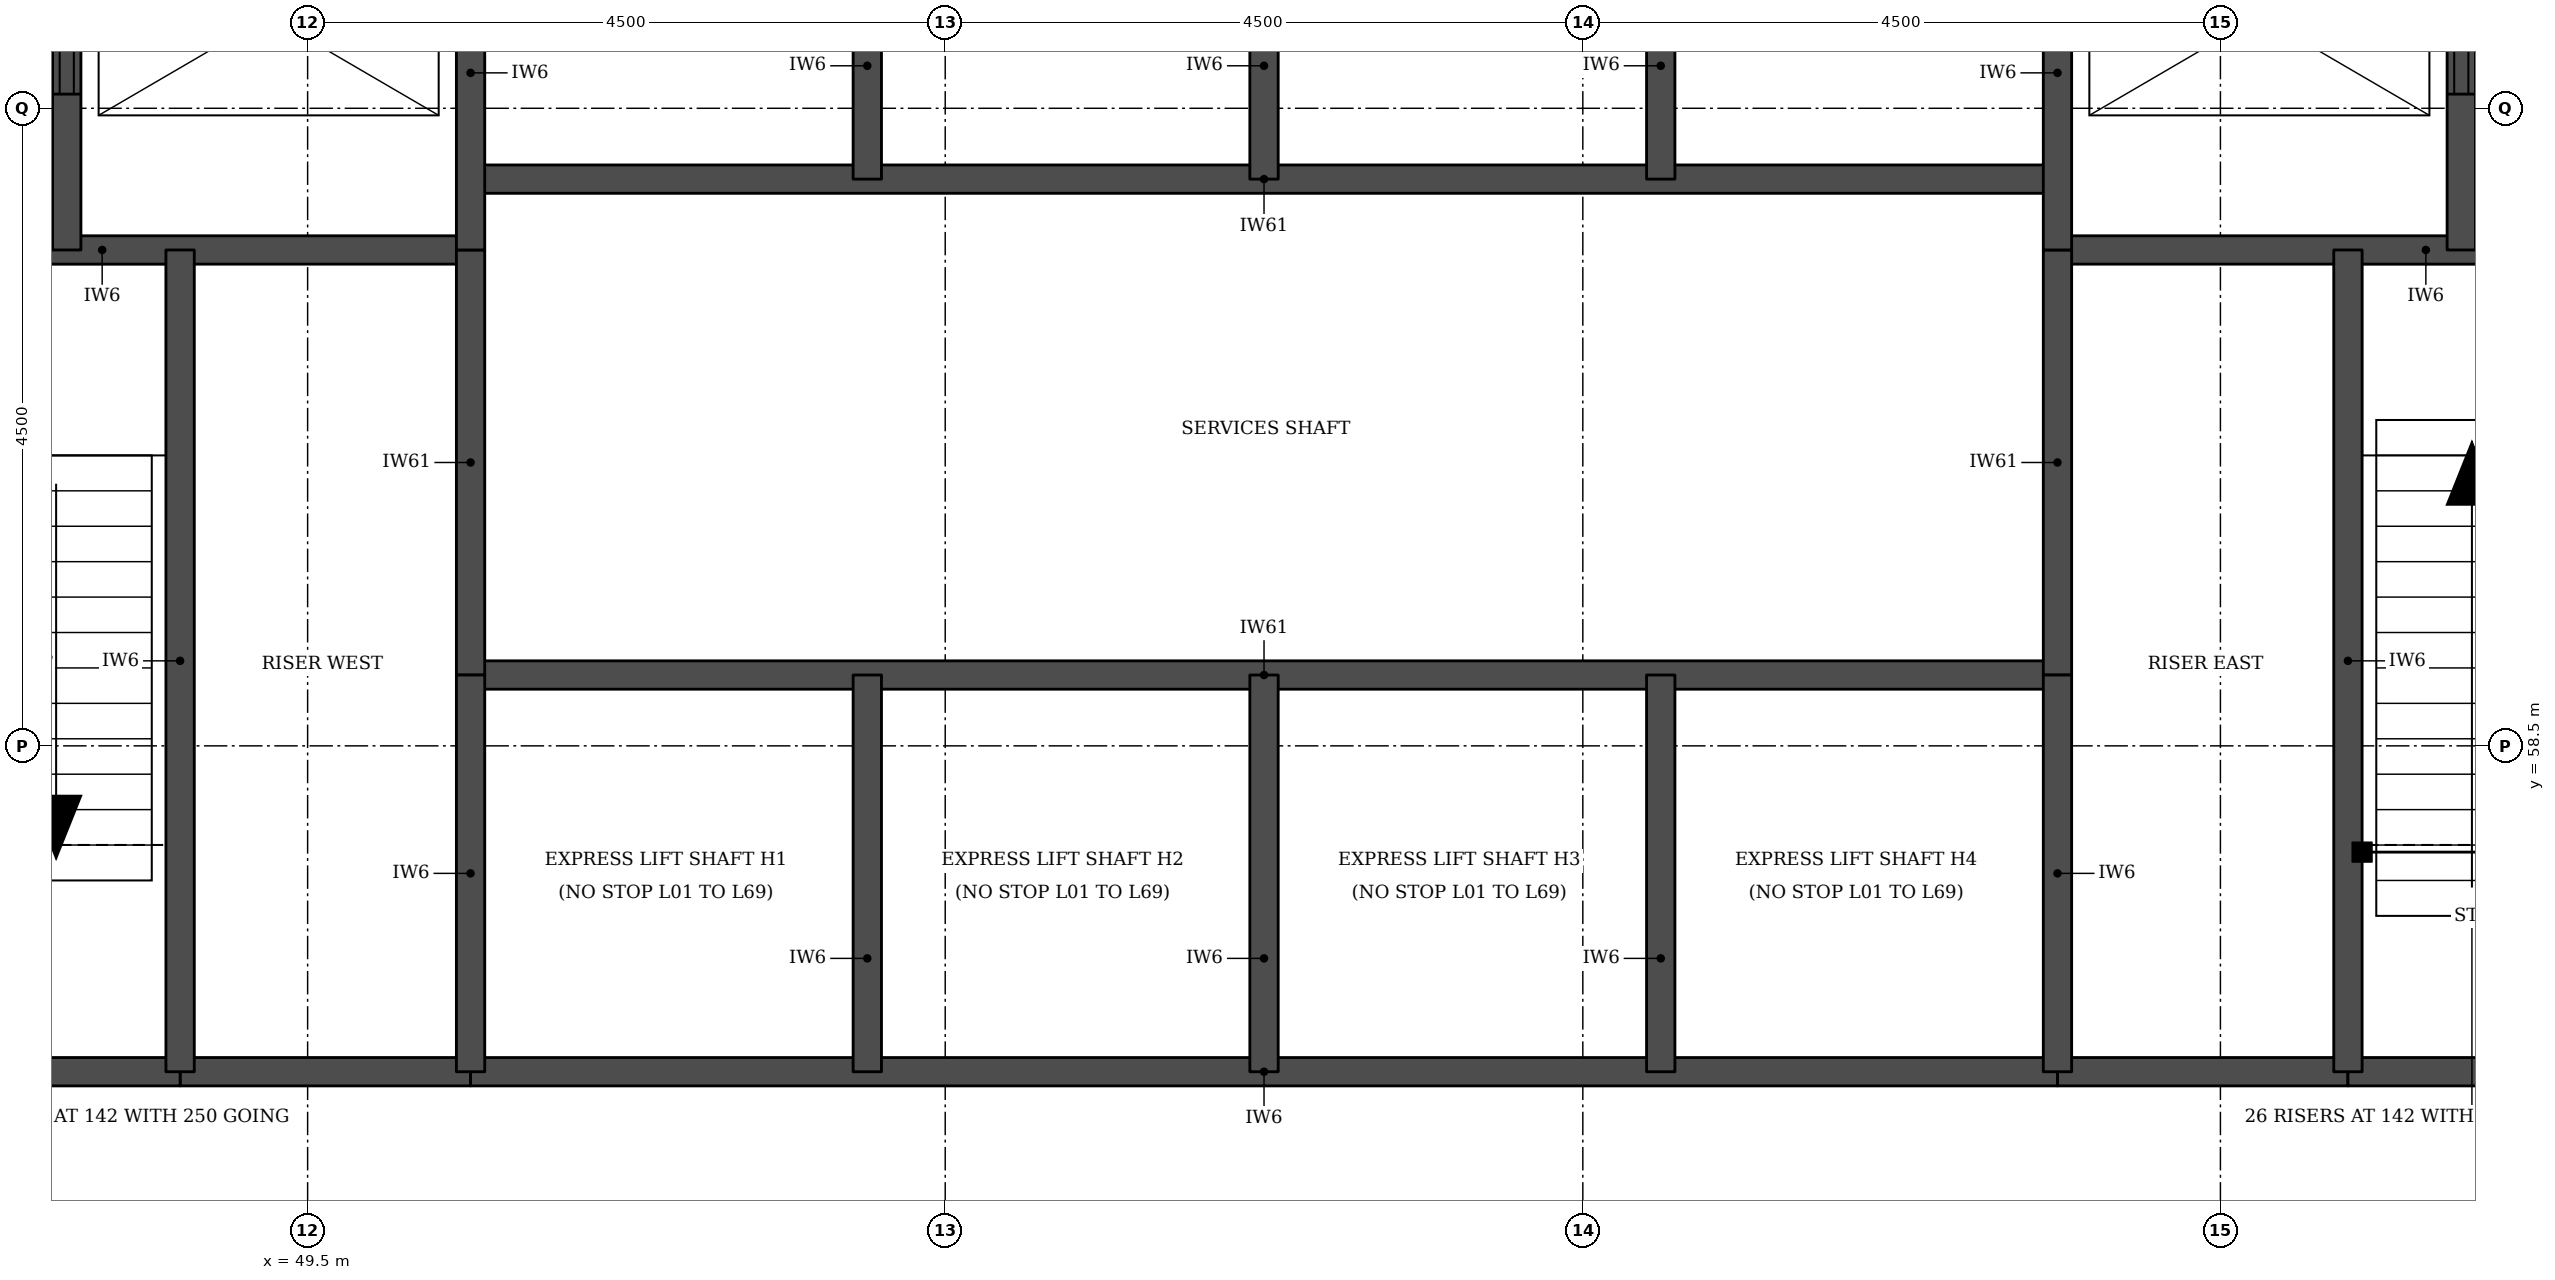
"""IFC4 building model, lengths in metres.
Left out: names, types, materials, properties, quantities, classifications, styles, units other than length and angle.
Written with IfcOpenShell. Run it as: python <this file> out.ifc"""

import sys

from ifc_helpers import new_model, si_unit, direction, frame, frame_2d, origin, place, context, subcontext, project, spatial, rectangle, extrude, element, fill, save


model = new_model("IFC4")
c1 = context("Model", 3, precision=1e-05, world=origin(), true_north=direction((0.0, 1.0)))
c2 = subcontext(c1, "Body", "Model", "MODEL_VIEW")
j1 = project(units=[si_unit("LENGTHUNIT", "METRE"), si_unit("PLANEANGLEUNIT", "RADIAN")], contexts=[c1])
p1 = place(None, origin())
s1 = spatial("IfcSite", under=j1, at=p1, CompositionType="ELEMENT")
p2 = place(p1, origin())
s2 = spatial("IfcBuilding", under=s1, at=p2, CompositionType="ELEMENT")
p3 = place(p2, frame((0.0, 0.0, 115.9)))
s3 = spatial("IfcBuildingStorey", under=s2, at=p3, CompositionType="ELEMENT", Elevation=115.9)
for number, where, z_axis, x_axis in (
    (1, (48.6, 56.2, 0.0), (0.0, 0.0, 1.0), (1.0, 0.0, 0.0)),
    (2, (61.85, 56.2, 0.0), (0.0, 0.0, 1.0), (1.0, 0.0, 0.0)),
):
    element("IfcWall", number, at=place(p3, frame(where, z_axis=z_axis, x_axis=x_axis)), inside=s3, PredefinedType="SOLIDWALL", context=c2, shape_type="SweptSolid", body=[
        extrude(rectangle(XDim=2.05, YDim=0.2, at=frame_2d((1.025, 0.0))), origin(), (0.0, 0.0, 1.0), 3.55),
    ])
p4 = place(p3, frame((45.45, 56.2, 0.0), z_axis=(0.0, 0.0, 1.0), x_axis=(1.0, 0.0, 0.0)))
e3 = element("IfcWall", 3, at=p4, inside=s3, PredefinedType="SOLIDWALL", context=c2, shape_type="SweptSolid", body=[
    extrude(rectangle(XDim=3.15, YDim=0.2, at=frame_2d((1.575, 0.0))), origin(), (0.0, 0.0, 1.0), 3.55),
])
p5 = place(p3, frame((50.65, 56.2, 0.0), z_axis=(0.0, 0.0, 1.0), x_axis=(1.0, 0.0, 0.0)))
e4 = element("IfcWall", 4, at=p5, inside=s3, PredefinedType="SOLIDWALL", context=c2, shape_type="SweptSolid", body=[
    extrude(rectangle(XDim=11.2, YDim=0.2, at=frame_2d((5.6, 0.0))), origin(), (0.0, 0.0, 1.0), 3.55),
])
p6 = place(p3, frame((63.9, 56.2, 0.0), z_axis=(0.0, 0.0, 1.0), x_axis=(1.0, 0.0, 0.0)))
e5 = element("IfcWall", 5, at=p6, inside=s3, PredefinedType="SOLIDWALL", context=c2, shape_type="SweptSolid", body=[
    extrude(rectangle(XDim=3.15, YDim=0.2, at=frame_2d((1.575, 0.0))), origin(), (0.0, 0.0, 1.0), 3.55),
])
p7 = place(p3, frame((50.65, 59.0, 0.0), z_axis=(0.0, 0.0, 1.0), x_axis=(1.0, 0.0, 0.0)))
e6 = element("IfcWall", 6, at=p7, inside=s3, PredefinedType="SOLIDWALL", context=c2, shape_type="SweptSolid", body=[
    extrude(rectangle(XDim=11.2, YDim=0.2, at=frame_2d((5.6, 0.0))), origin(), (0.0, 0.0, 1.0), 3.7),
])
for number, where, z_axis, x_axis in (
    (7, (45.45, 62.0, 0.0), (0.0, 0.0, 1.0), (1.0, 0.0, 0.0)),
    (8, (61.85, 62.0, 0.0), (0.0, 0.0, 1.0), (1.0, 0.0, 0.0)),
):
    element("IfcWall", number, at=place(p3, frame(where, z_axis=z_axis, x_axis=x_axis)), inside=s3, PredefinedType="SOLIDWALL", context=c2, shape_type="SweptSolid", body=[
        extrude(rectangle(XDim=5.2, YDim=0.2, at=frame_2d((2.6, 0.0))), origin(), (0.0, 0.0, 1.0), 3.55),
    ])
p8 = place(p3, frame((50.65, 62.5, 0.0), z_axis=(0.0, 0.0, 1.0), x_axis=(1.0, 0.0, 0.0)))
e9 = element("IfcWall", 9, at=p8, inside=s3, PredefinedType="SOLIDWALL", context=c2, shape_type="SweptSolid", body=[
    extrude(rectangle(XDim=11.2, YDim=0.2, at=frame_2d((5.6, 0.0))), origin(), (0.0, 0.0, 1.0), 3.7),
])
p9 = place(p3, frame((47.8, 62.0, 0.0), z_axis=(0.0, 0.0, 1.0), x_axis=(0.0, 1.0, 0.0)))
e10 = element("IfcWall", 10, at=p9, inside=s3, PredefinedType="SOLIDWALL", context=c2, shape_type="SweptSolid", body=[
    extrude(rectangle(XDim=3.3, YDim=0.2, at=frame_2d((1.65, 0.0))), origin(), (0.0, 0.0, 1.0), 3.55),
])
p10 = place(p9, frame((1.1, 0.0, 0.0)))
e11 = element("IfcOpeningElement", 11, at=p10, cuts=e10, PredefinedType="OPENING", context=c2, shape_type="SweptSolid", body=[
    extrude(rectangle(XDim=1.1, YDim=2.1, at=frame_2d((0.55, 1.05))), frame((0.0, 0.11, 0.0), z_axis=(0.0, -1.0, 0.0), x_axis=(1.0, 0.0, 0.0)), (0.0, 0.0, 1.0), 0.22),
])
p11 = place(p3, frame((48.6, 56.2, 0.0), z_axis=(0.0, 0.0, 1.0), x_axis=(0.0, 1.0, 0.0)))
e12 = element("IfcWall", 12, at=p11, inside=s3, PredefinedType="SOLIDWALL", context=c2, shape_type="SweptSolid", body=[
    extrude(rectangle(XDim=5.8, YDim=0.2, at=frame_2d((2.9, 0.0))), origin(), (0.0, 0.0, 1.0), 3.55),
])
p12 = place(p3, frame((50.65, 59.0, 0.0), z_axis=(0.0, 0.0, 1.0), x_axis=(0.0, 1.0, 0.0)))
e13 = element("IfcWall", 13, at=p12, inside=s3, PredefinedType="SOLIDWALL", context=c2, shape_type="SweptSolid", body=[
    extrude(rectangle(XDim=3.0, YDim=0.2, at=frame_2d((1.5, 0.0))), origin(), (0.0, 0.0, 1.0), 3.7),
])
p13 = place(p3, frame((50.65, 56.2, 0.0), z_axis=(0.0, 0.0, 1.0), x_axis=(0.0, 1.0, 0.0)))
e14 = element("IfcWall", 14, at=p13, inside=s3, PredefinedType="SOLIDWALL", context=c2, shape_type="SweptSolid", body=[
    extrude(rectangle(XDim=2.8, YDim=0.2, at=frame_2d((1.4, 0.0))), origin(), (0.0, 0.0, 1.0), 3.55),
])
p14 = place(p3, frame((50.65, 62.0, 0.0), z_axis=(0.0, 0.0, 1.0), x_axis=(0.0, 1.0, 0.0)))
e15 = element("IfcWall", 15, at=p14, inside=s3, PredefinedType="SOLIDWALL", context=c2, shape_type="SweptSolid", body=[
    extrude(rectangle(XDim=3.3, YDim=0.2, at=frame_2d((1.65, 0.0))), origin(), (0.0, 0.0, 1.0), 3.55),
])
for number, where, z_axis, x_axis in (
    (16, (53.45, 56.2, 0.0), (0.0, 0.0, 1.0), (0.0, 1.0, 0.0)),
    (17, (53.45, 62.5, 0.0), (0.0, 0.0, 1.0), (0.0, 1.0, 0.0)),
    (18, (56.25, 56.2, 0.0), (0.0, 0.0, 1.0), (0.0, 1.0, 0.0)),
    (19, (56.25, 62.5, 0.0), (0.0, 0.0, 1.0), (0.0, 1.0, 0.0)),
    (20, (59.05, 56.2, 0.0), (0.0, 0.0, 1.0), (0.0, 1.0, 0.0)),
    (21, (59.05, 62.5, 0.0), (0.0, 0.0, 1.0), (0.0, 1.0, 0.0)),
):
    element("IfcWall", number, at=place(p3, frame(where, z_axis=z_axis, x_axis=x_axis)), inside=s3, PredefinedType="SOLIDWALL", context=c2, shape_type="SweptSolid", body=[
        extrude(rectangle(XDim=2.8, YDim=0.2, at=frame_2d((1.4, 0.0))), origin(), (0.0, 0.0, 1.0), 3.55),
    ])
p15 = place(p3, frame((61.85, 59.0, 0.0), z_axis=(0.0, 0.0, 1.0), x_axis=(0.0, 1.0, 0.0)))
e22 = element("IfcWall", 22, at=p15, inside=s3, PredefinedType="SOLIDWALL", context=c2, shape_type="SweptSolid", body=[
    extrude(rectangle(XDim=3.0, YDim=0.2, at=frame_2d((1.5, 0.0))), origin(), (0.0, 0.0, 1.0), 3.7),
])
p16 = place(p3, frame((61.85, 56.2, 0.0), z_axis=(0.0, 0.0, 1.0), x_axis=(0.0, 1.0, 0.0)))
e23 = element("IfcWall", 23, at=p16, inside=s3, PredefinedType="SOLIDWALL", context=c2, shape_type="SweptSolid", body=[
    extrude(rectangle(XDim=2.8, YDim=0.2, at=frame_2d((1.4, 0.0))), origin(), (0.0, 0.0, 1.0), 3.55),
])
p17 = place(p3, frame((61.85, 62.0, 0.0), z_axis=(0.0, 0.0, 1.0), x_axis=(0.0, 1.0, 0.0)))
e24 = element("IfcWall", 24, at=p17, inside=s3, PredefinedType="SOLIDWALL", context=c2, shape_type="SweptSolid", body=[
    extrude(rectangle(XDim=3.3, YDim=0.2, at=frame_2d((1.65, 0.0))), origin(), (0.0, 0.0, 1.0), 3.55),
])
p18 = place(p3, frame((63.9, 56.2, 0.0), z_axis=(0.0, 0.0, 1.0), x_axis=(0.0, 1.0, 0.0)))
e25 = element("IfcWall", 25, at=p18, inside=s3, PredefinedType="SOLIDWALL", context=c2, shape_type="SweptSolid", body=[
    extrude(rectangle(XDim=5.8, YDim=0.2, at=frame_2d((2.9, 0.0))), origin(), (0.0, 0.0, 1.0), 3.55),
])
p19 = place(p3, frame((64.7, 62.0, 0.0), z_axis=(0.0, 0.0, 1.0), x_axis=(0.0, 1.0, 0.0)))
e26 = element("IfcWall", 26, at=p19, inside=s3, PredefinedType="SOLIDWALL", context=c2, shape_type="SweptSolid", body=[
    extrude(rectangle(XDim=3.3, YDim=0.2, at=frame_2d((1.65, 0.0))), origin(), (0.0, 0.0, 1.0), 3.55),
])
p20 = place(p19, frame((1.1, 0.0, 0.0)))
e27 = element("IfcOpeningElement", 27, at=p20, cuts=e26, PredefinedType="OPENING", context=c2, shape_type="SweptSolid", body=[
    extrude(rectangle(XDim=1.1, YDim=2.1, at=frame_2d((0.55, 1.05))), frame((0.0, 0.11, 0.0), z_axis=(0.0, -1.0, 0.0), x_axis=(1.0, 0.0, 0.0)), (0.0, 0.0, 1.0), 0.22),
])
p21 = place(p10, origin())
e28 = element("IfcDoor", 28, at=p21, inside=s3, OperationType="DOUBLE_DOOR_SLIDING", PredefinedType="DOOR", context=c2, shape_type="SweptSolid", body=[
    extrude(rectangle(XDim=1.1, YDim=2.1, at=frame_2d((0.55, 1.05))), frame((0.0, 0.025, 0.0), z_axis=(0.0, -1.0, 0.0), x_axis=(1.0, 0.0, 0.0)), (0.0, 0.0, 1.0), 0.05),
])
fill(e11, e28)
p22 = place(p20, origin())
e29 = element("IfcDoor", 29, at=p22, inside=s3, OperationType="DOUBLE_DOOR_SLIDING", PredefinedType="DOOR", context=c2, shape_type="SweptSolid", body=[
    extrude(rectangle(XDim=1.1, YDim=2.1, at=frame_2d((0.55, 1.05))), frame((0.0, 0.025, 0.0), z_axis=(0.0, -1.0, 0.0), x_axis=(1.0, 0.0, 0.0)), (0.0, 0.0, 1.0), 0.05),
])
fill(e27, e29)
save(model, sys.argv[1])
